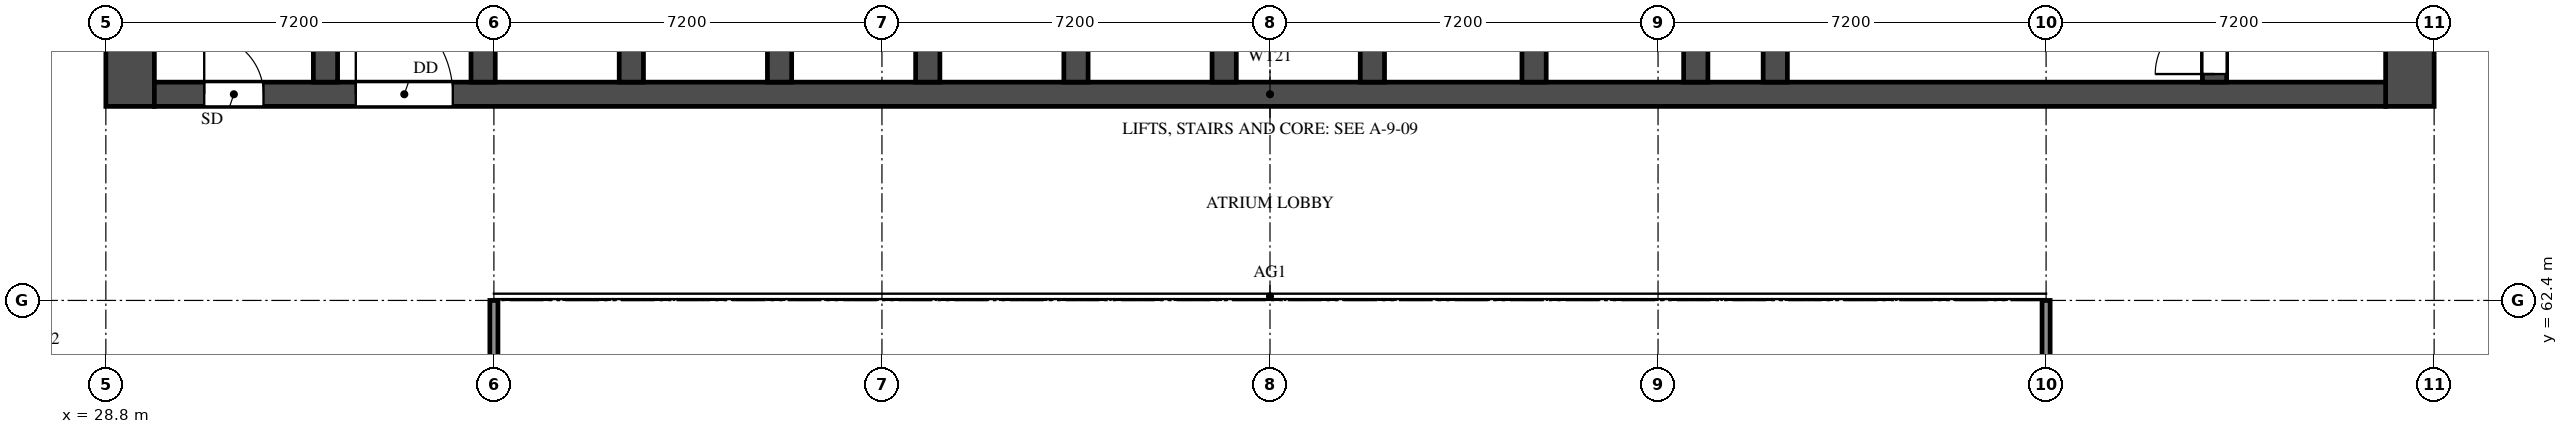
"""IFC4 building model, lengths in metres.
Left out: names, types, materials, properties, quantities, classifications, styles, units other than length and angle.
Written with IfcOpenShell. Run it as: python <this file> out.ifc"""

import sys

from ifc_helpers import new_model, si_unit, direction, frame, frame_2d, origin, place, context, subcontext, project, spatial, rectangle, extrude, element, fill, save


model = new_model("IFC4")
c1 = context("Model", 3, precision=1e-05, world=origin(), true_north=direction((0.0, 1.0)))
c2 = subcontext(c1, "Body", "Model", "MODEL_VIEW")
j1 = project(units=[si_unit("LENGTHUNIT", "METRE"), si_unit("PLANEANGLEUNIT", "RADIAN")], contexts=[c1])
p1 = place(None, origin())
s1 = spatial("IfcSite", under=j1, at=p1, CompositionType="ELEMENT")
p2 = place(p1, origin())
s2 = spatial("IfcBuilding", under=s1, at=p2, CompositionType="ELEMENT")
p3 = place(p2, frame((0.0, 0.0, 41.0)))
s3 = spatial("IfcBuildingStorey", under=s2, at=p3, CompositionType="ELEMENT", Elevation=41.0)
for number, where, z_axis, x_axis in (
    (1, (29.25, 66.0, 0.0), (0.0, 0.0, 1.0), (0.0, 1.0, 0.0)),
    (2, (71.55, 66.0, 0.0), (0.0, 0.0, 1.0), (0.0, 1.0, 0.0)),
):
    element("IfcWall", number, at=place(p3, frame(where, z_axis=z_axis, x_axis=x_axis)), inside=s3, PredefinedType="SHEAR", context=c2, shape_type="SweptSolid", body=[
        extrude(rectangle(XDim=12.0, YDim=0.9, at=frame_2d((6.0, 0.0))), origin(), (0.0, 0.0, 1.0), 3.18),
    ])
p4 = place(p3, frame((29.7, 66.225, 0.0), z_axis=(0.0, 0.0, 1.0), x_axis=(1.0, 0.0, 0.0)))
e3 = element("IfcWall", 3, at=p4, inside=s3, PredefinedType="SHEAR", context=c2, shape_type="SweptSolid", body=[
    extrude(rectangle(XDim=41.4, YDim=0.45, at=frame_2d((20.7, 0.0))), origin(), (0.0, 0.0, 1.0), 3.18),
])
p5 = place(p4, frame((0.925, 0.0, 0.0)))
e4 = element("IfcOpeningElement", 4, at=p5, cuts=e3, PredefinedType="OPENING", context=c2, shape_type="SweptSolid", body=[
    extrude(rectangle(XDim=1.1, YDim=2.1, at=frame_2d((0.55, 1.05))), frame((0.0, 0.235, 0.0), z_axis=(0.0, -1.0, 0.0), x_axis=(1.0, 0.0, 0.0)), (0.0, 0.0, 1.0), 0.47),
])
p6 = place(p4, frame((3.738, 0.0, 0.0)))
e5 = element("IfcOpeningElement", 5, at=p6, cuts=e3, PredefinedType="OPENING", context=c2, shape_type="SweptSolid", body=[
    extrude(rectangle(XDim=1.8, YDim=2.1, at=frame_2d((0.9, 1.05))), frame((0.0, 0.235, 0.0), z_axis=(0.0, -1.0, 0.0), x_axis=(1.0, 0.0, 0.0)), (0.0, 0.0, 1.0), 0.47),
])
p7 = place(p3, frame((32.875, 66.45, 0.0), z_axis=(0.0, 0.0, 1.0), x_axis=(0.0, 1.0, 0.0)))
e6 = element("IfcWall", 6, at=p7, inside=s3, PredefinedType="SHEAR", context=c2, shape_type="SweptSolid", body=[
    extrude(rectangle(XDim=10.65, YDim=0.45, at=frame_2d((5.325, 0.0))), origin(), (0.0, 0.0, 1.0), 3.18),
])
p8 = place(p3, frame((67.925, 66.45, 0.0), z_axis=(0.0, 0.0, 1.0), x_axis=(0.0, 1.0, 0.0)))
e7 = element("IfcWall", 7, at=p8, inside=s3, PredefinedType="SHEAR", context=c2, shape_type="SweptSolid", body=[
    extrude(rectangle(XDim=10.65, YDim=0.45, at=frame_2d((5.325, 0.0))), origin(), (0.0, 0.0, 1.0), 3.18),
])
p9 = place(p8, frame((0.15, 0.0, 0.0)))
e8 = element("IfcOpeningElement", 8, at=p9, cuts=e7, PredefinedType="OPENING", context=c2, shape_type="SweptSolid", body=[
    extrude(rectangle(XDim=1.1, YDim=2.1, at=frame_2d((0.55, 1.05))), frame((0.0, 0.235, 0.0), z_axis=(0.0, -1.0, 0.0), x_axis=(1.0, 0.0, 0.0)), (0.0, 0.0, 1.0), 0.47),
])
p10 = place(p3, frame((59.775, 66.45, 0.0), z_axis=(0.0, 0.0, 1.0), x_axis=(0.0, 1.0, 0.0)))
e9 = element("IfcWall", 9, at=p10, inside=s3, PredefinedType="SHEAR", context=c2, shape_type="SweptSolid", body=[
    extrude(rectangle(XDim=6.025, YDim=0.45, at=frame_2d((3.013, 0.0))), origin(), (0.0, 0.0, 1.0), 3.18),
])
p11 = place(p10, frame((3.85, 0.0, 0.0)))
e10 = element("IfcOpeningElement", 10, at=p11, cuts=e9, PredefinedType="OPENING", context=c2, shape_type="SweptSolid", body=[
    extrude(rectangle(XDim=1.2, YDim=2.1, at=frame_2d((0.6, 1.05))), frame((0.0, 0.235, 0.0), z_axis=(0.0, -1.0, 0.0), x_axis=(1.0, 0.0, 0.0)), (0.0, 0.0, 1.0), 0.47),
])
for number, where, z_axis, x_axis in (
    (11, (35.8, 66.45, 0.0), (0.0, 0.0, 1.0), (0.0, 1.0, 0.0)),
    (12, (38.55, 66.45, 0.0), (0.0, 0.0, 1.0), (0.0, 1.0, 0.0)),
    (13, (41.3, 66.45, 0.0), (0.0, 0.0, 1.0), (0.0, 1.0, 0.0)),
    (14, (44.05, 66.45, 0.0), (0.0, 0.0, 1.0), (0.0, 1.0, 0.0)),
    (15, (46.8, 66.45, 0.0), (0.0, 0.0, 1.0), (0.0, 1.0, 0.0)),
    (16, (49.55, 66.45, 0.0), (0.0, 0.0, 1.0), (0.0, 1.0, 0.0)),
    (17, (52.3, 66.45, 0.0), (0.0, 0.0, 1.0), (0.0, 1.0, 0.0)),
    (18, (55.3, 66.45, 0.0), (0.0, 0.0, 1.0), (0.0, 1.0, 0.0)),
    (19, (58.3, 66.45, 0.0), (0.0, 0.0, 1.0), (0.0, 1.0, 0.0)),
):
    element("IfcWall", number, at=place(p3, frame(where, z_axis=z_axis, x_axis=x_axis)), inside=s3, PredefinedType="SHEAR", context=c2, shape_type="SweptSolid", body=[
        extrude(rectangle(XDim=2.425, YDim=0.45, at=frame_2d((1.212, 0.0))), origin(), (0.0, 0.0, 1.0), 3.18),
    ])
for number, where, z_axis, x_axis in (
    (20, (36.0, 48.0, 0.0), (0.0, 0.0, 1.0), (0.0, 1.0, 0.0)),
    (21, (64.8, 48.0, 0.0), (0.0, 0.0, 1.0), (0.0, 1.0, 0.0)),
):
    element("IfcWall", number, at=place(p3, frame(where, z_axis=z_axis, x_axis=x_axis)), inside=s3, PredefinedType="SOLIDWALL", context=c2, shape_type="SweptSolid", body=[
        extrude(rectangle(XDim=14.4, YDim=0.15, at=frame_2d((7.2, 0.0))), origin(), (0.0, 0.0, 1.0), 2.28),
    ])
p12 = place(p5, origin())
e22 = element("IfcDoor", 22, at=p12, inside=s3, OperationType="SINGLE_SWING_LEFT", PredefinedType="DOOR", context=c2, shape_type="SweptSolid", body=[
    extrude(rectangle(XDim=1.1, YDim=2.1, at=frame_2d((0.55, 1.05))), frame((0.0, 0.025, 0.0), z_axis=(0.0, -1.0, 0.0), x_axis=(1.0, 0.0, 0.0)), (0.0, 0.0, 1.0), 0.05),
])
fill(e4, e22)
p13 = place(p9, origin())
e23 = element("IfcDoor", 23, at=p13, inside=s3, OperationType="SINGLE_SWING_LEFT", PredefinedType="DOOR", context=c2, shape_type="SweptSolid", body=[
    extrude(rectangle(XDim=1.1, YDim=2.1, at=frame_2d((0.55, 1.05))), frame((0.0, 0.025, 0.0), z_axis=(0.0, -1.0, 0.0), x_axis=(1.0, 0.0, 0.0)), (0.0, 0.0, 1.0), 0.05),
])
fill(e8, e23)
p14 = place(p6, origin())
e24 = element("IfcDoor", 24, at=p14, inside=s3, OperationType="DOUBLE_DOOR_SINGLE_SWING", PredefinedType="DOOR", context=c2, shape_type="SweptSolid", body=[
    extrude(rectangle(XDim=1.8, YDim=2.1, at=frame_2d((0.9, 1.05))), frame((0.0, 0.025, 0.0), z_axis=(0.0, -1.0, 0.0), x_axis=(1.0, 0.0, 0.0)), (0.0, 0.0, 1.0), 0.05),
])
fill(e5, e24)
save(model, sys.argv[1])
